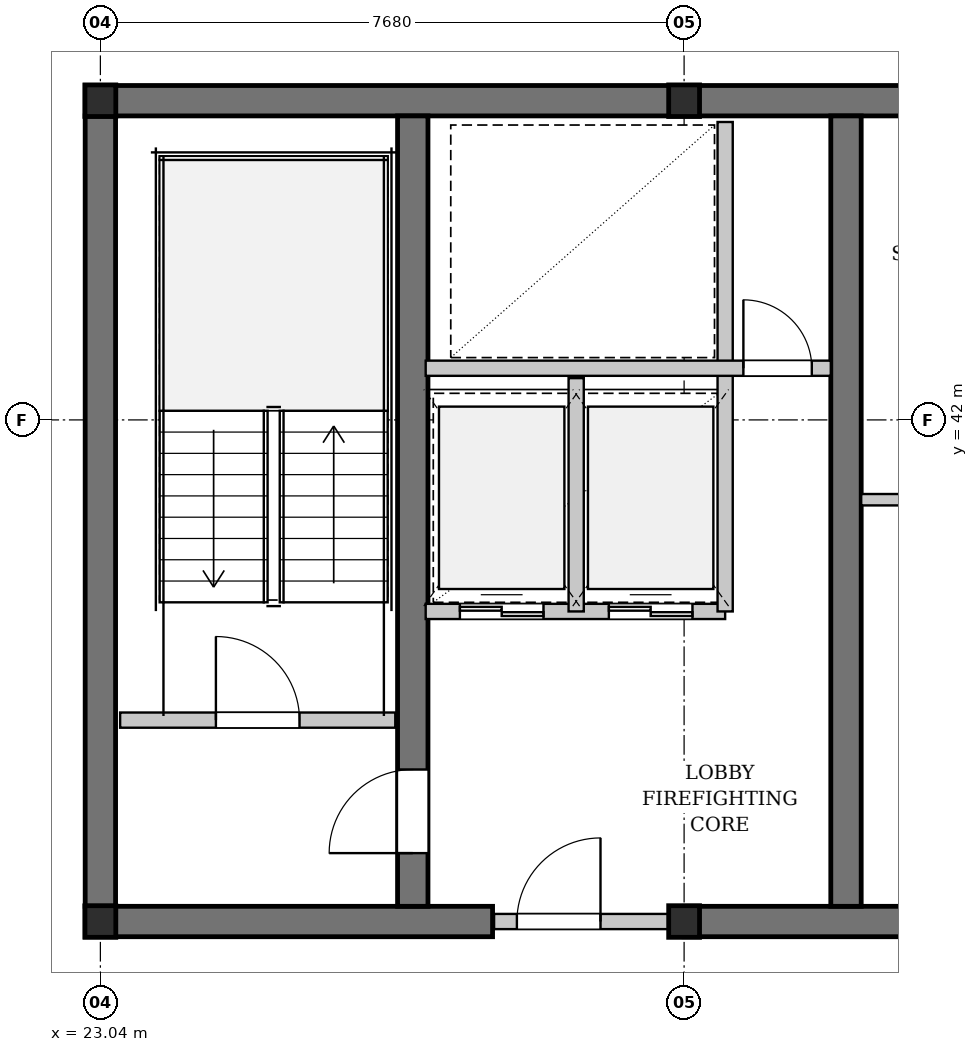
"""IFC4 building model, lengths in metres.
Left out: names, types, materials, properties, quantities, classifications, styles, units other than length and angle.
Written with IfcOpenShell. Run it as: python <this file> out.ifc"""

import sys

from ifc_helpers import new_model, si_unit, direction, frame, frame_2d, origin, origin_2d, place, context, subcontext, project, spatial, rectangle, i_section, extrude, element, fill, save


model = new_model("IFC4")
c1 = context("Model", 3, precision=1e-05, world=origin(), true_north=direction((0.0, 1.0)))
c2 = subcontext(c1, "Body", "Model", "MODEL_VIEW")
j1 = project(units=[si_unit("LENGTHUNIT", "METRE"), si_unit("PLANEANGLEUNIT", "RADIAN")], contexts=[c1])
p1 = place(None, origin())
s1 = spatial("IfcSite", under=j1, at=p1, CompositionType="ELEMENT")
p2 = place(p1, origin())
s2 = spatial("IfcBuilding", under=s1, at=p2, CompositionType="ELEMENT")
p3 = place(p2, frame((0.0, 0.0, 282.9)))
s3 = spatial("IfcBuildingStorey", under=s2, at=p3, CompositionType="ELEMENT", Elevation=282.9)
p4 = place(p3, frame((22.84, 46.2, 0.0), z_axis=(0.0, 0.0, 1.0), x_axis=(1.0, 0.0, 0.0)))
e1 = element("IfcWall", 1, at=p4, inside=s3, PredefinedType="SHEAR", context=c2, shape_type="SweptSolid", body=[
    extrude(rectangle(XDim=31.12, YDim=0.4, at=frame_2d((15.56, 0.0))), origin(), (0.0, 0.0, 1.0), 3.18),
])
p5 = place(p3, frame((22.84, 35.4, 0.0), z_axis=(0.0, 0.0, 1.0), x_axis=(1.0, 0.0, 0.0)))
e2 = element("IfcWall", 2, at=p5, inside=s3, PredefinedType="SHEAR", context=c2, shape_type="SweptSolid", body=[
    extrude(rectangle(XDim=5.36, YDim=0.4, at=frame_2d((2.68, 0.0))), origin(), (0.0, 0.0, 1.0), 3.18),
])
p6 = place(p3, frame((30.72, 35.4, 0.0), z_axis=(0.0, 0.0, 1.0), x_axis=(1.0, 0.0, 0.0)))
e3 = element("IfcWall", 3, at=p6, inside=s3, PredefinedType="SHEAR", context=c2, shape_type="SweptSolid", body=[
    extrude(rectangle(XDim=4.88, YDim=0.4, at=frame_2d((2.44, 0.0))), origin(), (0.0, 0.0, 1.0), 3.18),
])
p7 = place(p3, frame((23.04, 35.6, 0.0), z_axis=(0.0, 0.0, 1.0), x_axis=(0.0, 1.0, 0.0)))
e4 = element("IfcWall", 4, at=p7, inside=s3, PredefinedType="SHEAR", context=c2, shape_type="SweptSolid", body=[
    extrude(rectangle(XDim=10.4, YDim=0.4, at=frame_2d((5.2, 0.0))), origin(), (0.0, 0.0, 1.0), 3.18),
])
p8 = place(p3, frame((27.15, 35.6, 0.0), z_axis=(0.0, 0.0, 1.0), x_axis=(0.0, 1.0, 0.0)))
e5 = element("IfcWall", 5, at=p8, inside=s3, PredefinedType="SHEAR", context=c2, shape_type="SweptSolid", body=[
    extrude(rectangle(XDim=10.4, YDim=0.4, at=frame_2d((5.2, 0.0))), origin(), (0.0, 0.0, 1.0), 3.18),
])
p9 = place(p8, frame((0.7, 0.0, 0.0)))
e6 = element("IfcOpeningElement", 6, at=p9, cuts=e5, PredefinedType="OPENING", context=c2, shape_type="SweptSolid", body=[
    extrude(rectangle(XDim=1.1, YDim=2.15, at=frame_2d((0.55, 1.075))), frame((0.0, 0.21, 0.0), z_axis=(0.0, -1.0, 0.0), x_axis=(1.0, 0.0, 0.0)), (0.0, 0.0, 1.0), 0.42),
])
p10 = place(p3, frame((32.85, 35.6, 0.0), z_axis=(0.0, 0.0, 1.0), x_axis=(0.0, 1.0, 0.0)))
e7 = element("IfcWall", 7, at=p10, inside=s3, PredefinedType="SHEAR", context=c2, shape_type="SweptSolid", body=[
    extrude(rectangle(XDim=10.4, YDim=0.4, at=frame_2d((5.2, 0.0))), origin(), (0.0, 0.0, 1.0), 3.18),
])
for number, where, z_axis, x_axis in (
    (8, (23.04, 35.4, 0.0), (0.0, 0.0, 1.0), (1.0, 0.0, 0.0)),
    (9, (23.04, 46.2, 0.0), (0.0, 0.0, 1.0), (1.0, 0.0, 0.0)),
    (10, (30.72, 35.4, 0.0), (0.0, 0.0, 1.0), (1.0, 0.0, 0.0)),
    (11, (30.72, 46.2, 0.0), (0.0, 0.0, 1.0), (1.0, 0.0, 0.0)),
):
    element("IfcColumn", number, at=place(p3, frame(where, z_axis=z_axis, x_axis=x_axis)), inside=s3, PredefinedType="COLUMN", context=c2, shape_type="SweptSolid", body=[
        extrude(i_section(OverallWidth=0.406, OverallDepth=0.416, WebThickness=0.03, FlangeThickness=0.048, FilletRadius=0.015, at=origin_2d()), origin(), (0.0, 0.0, 1.0), 3.4),
    ])
p11 = place(p3, frame((23.3, 38.05, 0.0), z_axis=(0.0, 0.0, 1.0), x_axis=(1.0, 0.0, 0.0)))
e12 = element("IfcWall", 12, at=p11, inside=s3, PredefinedType="PARTITIONING", context=c2, shape_type="SweptSolid", body=[
    extrude(rectangle(XDim=3.62, YDim=0.2, at=frame_2d((1.81, 0.0))), origin(), (0.0, 0.0, 1.0), 3.18),
])
p12 = place(p11, frame((1.26, 0.0, 0.0)))
e13 = element("IfcOpeningElement", 13, at=p12, cuts=e12, PredefinedType="OPENING", context=c2, shape_type="SweptSolid", body=[
    extrude(rectangle(XDim=1.1, YDim=2.15, at=frame_2d((0.55, 1.075))), frame((0.0, 0.11, 0.0), z_axis=(0.0, -1.0, 0.0), x_axis=(1.0, 0.0, 0.0)), (0.0, 0.0, 1.0), 0.22),
])
p13 = place(p3, frame((28.22, 35.4, 0.0), z_axis=(0.0, 0.0, 1.0), x_axis=(1.0, 0.0, 0.0)))
e14 = element("IfcWall", 14, at=p13, inside=s3, PredefinedType="PARTITIONING", context=c2, shape_type="SweptSolid", body=[
    extrude(rectangle(XDim=2.5, YDim=0.2, at=frame_2d((1.25, 0.0))), origin(), (0.0, 0.0, 1.0), 2.575),
])
p14 = place(p13, frame((0.3, 0.0, 0.0)))
e15 = element("IfcOpeningElement", 15, at=p14, cuts=e14, PredefinedType="OPENING", context=c2, shape_type="SweptSolid", body=[
    extrude(rectangle(XDim=1.1, YDim=2.15, at=frame_2d((0.55, 1.075))), frame((0.0, 0.11, 0.0), z_axis=(0.0, -1.0, 0.0), x_axis=(1.0, 0.0, 0.0)), (0.0, 0.0, 1.0), 0.22),
])
p15 = place(p3, frame((27.32, 39.48, 0.0), z_axis=(0.0, 0.0, 1.0), x_axis=(1.0, 0.0, 0.0)))
e16 = element("IfcWall", 16, at=p15, inside=s3, PredefinedType="PARTITIONING", context=c2, shape_type="SweptSolid", body=[
    extrude(rectangle(XDim=3.94, YDim=0.2, at=frame_2d((1.97, 0.0))), origin(), (0.0, 0.0, 1.0), 3.18),
])
p16 = place(p15, frame((0.45, 0.0, 0.0)))
e17 = element("IfcOpeningElement", 17, at=p16, cuts=e16, PredefinedType="OPENING", context=c2, shape_type="SweptSolid", body=[
    extrude(rectangle(XDim=1.1, YDim=2.2, at=frame_2d((0.55, 1.1))), frame((0.0, 0.11, 0.0), z_axis=(0.0, -1.0, 0.0), x_axis=(1.0, 0.0, 0.0)), (0.0, 0.0, 1.0), 0.22),
])
p17 = place(p15, frame((2.41, 0.0, 0.0)))
e18 = element("IfcOpeningElement", 18, at=p17, cuts=e16, PredefinedType="OPENING", context=c2, shape_type="SweptSolid", body=[
    extrude(rectangle(XDim=1.1, YDim=2.2, at=frame_2d((0.55, 1.1))), frame((0.0, 0.11, 0.0), z_axis=(0.0, -1.0, 0.0), x_axis=(1.0, 0.0, 0.0)), (0.0, 0.0, 1.0), 0.22),
])
p18 = place(p3, frame((29.3, 39.48, 0.0), z_axis=(0.0, 0.0, 1.0), x_axis=(0.0, 1.0, 0.0)))
e19 = element("IfcWall", 19, at=p18, inside=s3, PredefinedType="PARTITIONING", context=c2, shape_type="SweptSolid", body=[
    extrude(rectangle(XDim=3.07, YDim=0.2, at=frame_2d((1.535, 0.0))), origin(), (0.0, 0.0, 1.0), 3.18),
])
p19 = place(p3, frame((31.26, 39.48, 0.0), z_axis=(0.0, 0.0, 1.0), x_axis=(0.0, 1.0, 0.0)))
e20 = element("IfcWall", 20, at=p19, inside=s3, PredefinedType="PARTITIONING", context=c2, shape_type="SweptSolid", body=[
    extrude(rectangle(XDim=6.44, YDim=0.2, at=frame_2d((3.22, 0.0))), origin(), (0.0, 0.0, 1.0), 3.18),
])
p20 = place(p3, frame((27.32, 42.68, 0.0), z_axis=(0.0, 0.0, 1.0), x_axis=(1.0, 0.0, 0.0)))
e21 = element("IfcWall", 21, at=p20, inside=s3, PredefinedType="PARTITIONING", context=c2, shape_type="SweptSolid", body=[
    extrude(rectangle(XDim=5.33, YDim=0.2, at=frame_2d((2.665, 0.0))), origin(), (0.0, 0.0, 1.0), 3.18),
])
p21 = place(p20, frame((4.18, 0.0, 0.0)))
e22 = element("IfcOpeningElement", 22, at=p21, cuts=e21, PredefinedType="OPENING", context=c2, shape_type="SweptSolid", body=[
    extrude(rectangle(XDim=0.9, YDim=2.15, at=frame_2d((0.45, 1.075))), frame((0.0, 0.11, 0.0), z_axis=(0.0, -1.0, 0.0), x_axis=(1.0, 0.0, 0.0)), (0.0, 0.0, 1.0), 0.22),
])
p22 = place(p3, frame((33.05, 40.95, 0.0), z_axis=(0.0, 0.0, 1.0), x_axis=(1.0, 0.0, 0.0)))
e23 = element("IfcWall", 23, at=p22, inside=s3, PredefinedType="PARTITIONING", context=c2, shape_type="SweptSolid", body=[
    extrude(rectangle(XDim=3.57, YDim=0.15, at=frame_2d((1.785, 0.0))), origin(), (0.0, 0.0, 1.0), 3.18),
])
p23 = place(p12, origin())
e24 = element("IfcDoor", 24, at=p23, inside=s3, OperationType="SINGLE_SWING_LEFT", PredefinedType="DOOR", context=c2, shape_type="SweptSolid", body=[
    extrude(rectangle(XDim=1.1, YDim=2.15, at=frame_2d((0.55, 1.075))), frame((0.0, 0.025, 0.0), z_axis=(0.0, -1.0, 0.0), x_axis=(1.0, 0.0, 0.0)), (0.0, 0.0, 1.0), 0.05),
])
fill(e13, e24)
p24 = place(p14, origin())
e25 = element("IfcDoor", 25, at=p24, inside=s3, OperationType="SINGLE_SWING_RIGHT", PredefinedType="DOOR", context=c2, shape_type="SweptSolid", body=[
    extrude(rectangle(XDim=1.1, YDim=2.15, at=frame_2d((0.55, 1.075))), frame((0.0, 0.025, 0.0), z_axis=(0.0, -1.0, 0.0), x_axis=(1.0, 0.0, 0.0)), (0.0, 0.0, 1.0), 0.05),
])
fill(e15, e25)
p25 = place(p16, origin())
e26 = element("IfcDoor", 26, at=p25, inside=s3, OperationType="DOUBLE_DOOR_SLIDING", PredefinedType="DOOR", context=c2, shape_type="SweptSolid", body=[
    extrude(rectangle(XDim=1.1, YDim=2.2, at=frame_2d((0.55, 1.1))), frame((0.0, 0.025, 0.0), z_axis=(0.0, -1.0, 0.0), x_axis=(1.0, 0.0, 0.0)), (0.0, 0.0, 1.0), 0.05),
])
fill(e17, e26)
p26 = place(p17, origin())
e27 = element("IfcDoor", 27, at=p26, inside=s3, OperationType="DOUBLE_DOOR_SLIDING", PredefinedType="DOOR", context=c2, shape_type="SweptSolid", body=[
    extrude(rectangle(XDim=1.1, YDim=2.2, at=frame_2d((0.55, 1.1))), frame((0.0, 0.025, 0.0), z_axis=(0.0, -1.0, 0.0), x_axis=(1.0, 0.0, 0.0)), (0.0, 0.0, 1.0), 0.05),
])
fill(e18, e27)
p27 = place(p21, origin())
e28 = element("IfcDoor", 28, at=p27, inside=s3, OperationType="SINGLE_SWING_LEFT", PredefinedType="DOOR", context=c2, shape_type="SweptSolid", body=[
    extrude(rectangle(XDim=0.9, YDim=2.15, at=frame_2d((0.45, 1.075))), frame((0.0, 0.025, 0.0), z_axis=(0.0, -1.0, 0.0), x_axis=(1.0, 0.0, 0.0)), (0.0, 0.0, 1.0), 0.05),
])
fill(e22, e28)
p28 = place(p9, origin())
e29 = element("IfcDoor", 29, at=p28, inside=s3, OperationType="SINGLE_SWING_LEFT", PredefinedType="DOOR", context=c2, shape_type="SweptSolid", body=[
    extrude(rectangle(XDim=1.1, YDim=2.15, at=frame_2d((0.55, 1.075))), frame((0.0, 0.025, 0.0), z_axis=(0.0, -1.0, 0.0), x_axis=(1.0, 0.0, 0.0)), (0.0, 0.0, 1.0), 0.05),
])
fill(e6, e29)
save(model, sys.argv[1])
